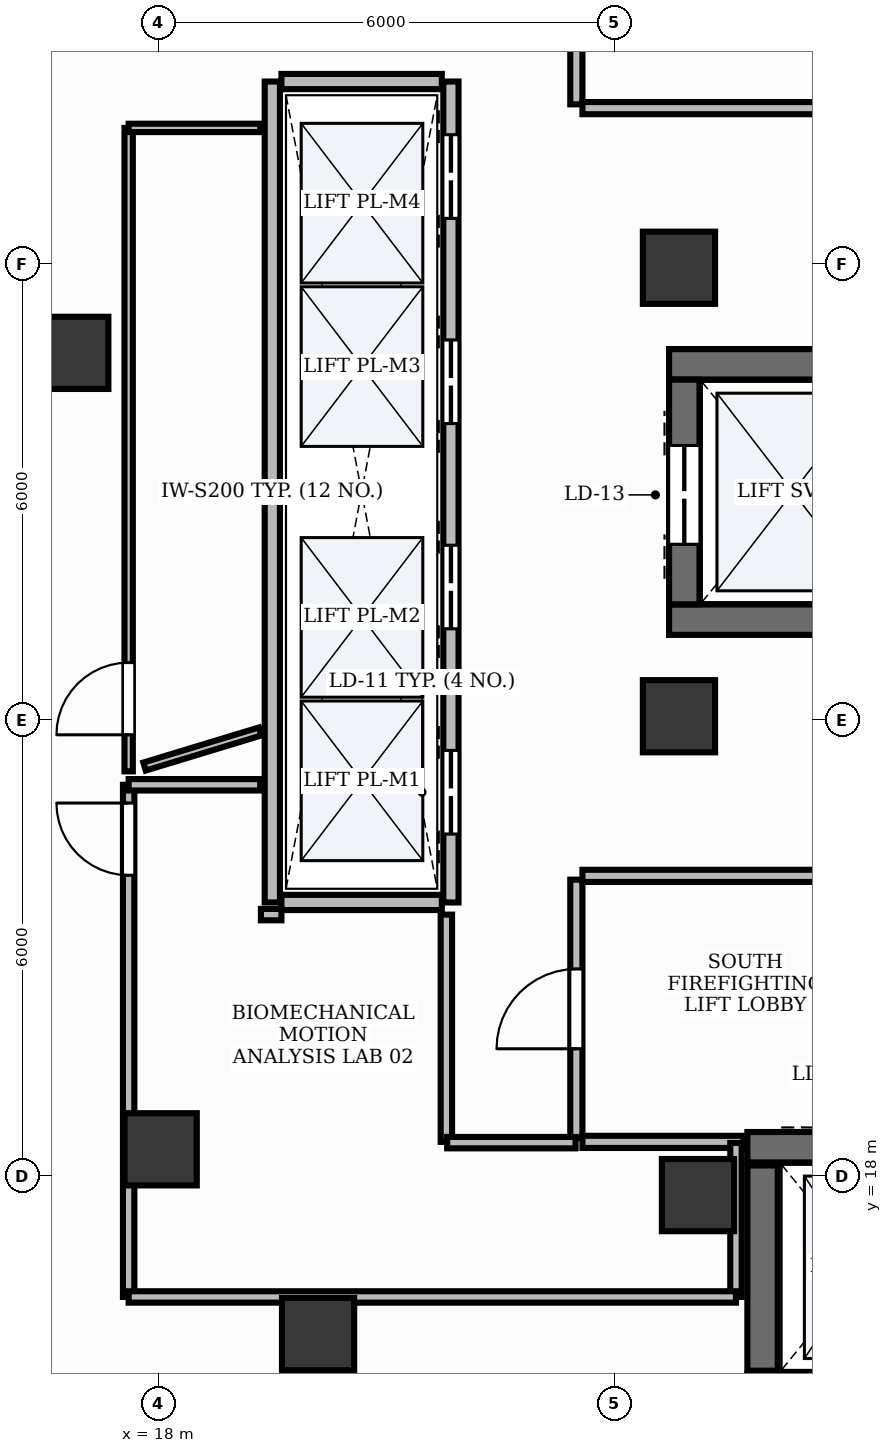
"""IFC4 building model, lengths in metres.
Left out: names, types, materials, properties, quantities, classifications, styles, units other than length and angle.
Written with IfcOpenShell. Run it as: python <this file> out.ifc"""

import sys

from ifc_helpers import new_model, si_unit, direction, frame, frame_2d, origin, origin_2d, place, context, subcontext, project, spatial, rectangle, extrude, element, fill, save


model = new_model("IFC4")
c1 = context("Model", 3, precision=1e-05, world=origin(), true_north=direction((0.0, 1.0)))
c2 = subcontext(c1, "Body", "Model", "MODEL_VIEW")
j1 = project(units=[si_unit("LENGTHUNIT", "METRE"), si_unit("PLANEANGLEUNIT", "RADIAN")], contexts=[c1])
p1 = place(None, origin())
s1 = spatial("IfcSite", under=j1, at=p1, CompositionType="ELEMENT")
p2 = place(p1, origin())
s2 = spatial("IfcBuilding", under=s1, at=p2, CompositionType="ELEMENT")
p3 = place(p2, frame((0.0, 0.0, 243.6)))
s3 = spatial("IfcBuildingStorey", under=s2, at=p3, CompositionType="ELEMENT", Elevation=243.6)
p4 = place(p3, frame((25.75, 18.38, 0.0), z_axis=(0.0, 0.0, 1.0), x_axis=(1.0, 0.0, 0.0)))
e1 = element("IfcWall", 1, at=p4, inside=s3, PredefinedType="SHEAR", context=c2, shape_type="SweptSolid", body=[
    extrude(rectangle(XDim=3.1, YDim=0.4, at=frame_2d((1.55, 0.0))), origin(), (0.0, 0.0, 1.0), 3.9),
])
p5 = place(p4, frame((0.9, 0.0, 0.0)))
e2 = element("IfcOpeningElement", 2, at=p5, cuts=e1, PredefinedType="OPENING", context=c2, shape_type="SweptSolid", body=[
    extrude(rectangle(XDim=1.3, YDim=2.2, at=frame_2d((0.65, 1.1))), frame((0.0, 0.215, 0.0), z_axis=(0.0, -1.0, 0.0), x_axis=(1.0, 0.0, 0.0)), (0.0, 0.0, 1.0), 0.43),
])
p6 = place(p3, frame((25.95, 15.44, 0.0), z_axis=(0.0, 0.0, 1.0), x_axis=(0.0, 1.0, 0.0)))
e3 = element("IfcWall", 3, at=p6, inside=s3, PredefinedType="SHEAR", context=c2, shape_type="SweptSolid", body=[
    extrude(rectangle(XDim=2.7, YDim=0.4, at=frame_2d((1.35, 0.0))), origin(), (0.0, 0.0, 1.0), 3.9),
])
for number, where, z_axis, x_axis in (
    (4, (24.72, 28.68, 0.0), (0.0, 0.0, 1.0), (1.0, 0.0, 0.0)),
    (5, (24.72, 25.32, 0.0), (0.0, 0.0, 1.0), (1.0, 0.0, 0.0)),
):
    element("IfcWall", number, at=place(p3, frame(where, z_axis=z_axis, x_axis=x_axis)), inside=s3, PredefinedType="SHEAR", context=c2, shape_type="SweptSolid", body=[
        extrude(rectangle(XDim=3.21, YDim=0.4, at=frame_2d((1.605, 0.0))), origin(), (0.0, 0.0, 1.0), 3.9),
    ])
p7 = place(p3, frame((24.92, 25.522, 0.0), z_axis=(0.0, 0.0, 1.0), x_axis=(0.0, 1.0, 0.0)))
e6 = element("IfcWall", 6, at=p7, inside=s3, PredefinedType="SHEAR", context=c2, shape_type="SweptSolid", body=[
    extrude(rectangle(XDim=2.956, YDim=0.4, at=frame_2d((1.478, 0.0))), origin(), (0.0, 0.0, 1.0), 3.9),
])
p8 = place(p7, frame((0.79, 0.0, 0.0)))
e7 = element("IfcOpeningElement", 7, at=p8, cuts=e6, PredefinedType="OPENING", context=c2, shape_type="SweptSolid", body=[
    extrude(rectangle(XDim=1.3, YDim=2.2, at=frame_2d((0.65, 1.1))), frame((0.0, 0.215, 0.0), z_axis=(0.0, -1.0, 0.0), x_axis=(1.0, 0.0, 0.0)), (0.0, 0.0, 1.0), 0.43),
])
for number, where, z_axis, x_axis in (
    (8, (24.85, 29.95, -0.0), (0.0, 0.0, 1.0), (1.0, 0.0, 0.0)),
    (9, (24.85, 24.05, -0.0), (0.0, 0.0, 1.0), (1.0, 0.0, 0.0)),
    (10, (25.1, 17.75, -0.0), (0.0, 0.0, 1.0), (1.0, 0.0, 0.0)),
):
    element("IfcColumn", number, at=place(p3, frame(where, z_axis=z_axis, x_axis=x_axis)), inside=s3, PredefinedType="PILASTER", context=c2, shape_type="SweptSolid", body=[
        extrude(rectangle(XDim=0.95, YDim=0.95, at=origin_2d()), origin(), (0.0, 0.0, 1.0), 3.901),
    ])
for number, where, z_axis, x_axis in (
    (11, (16.868, 28.83, -0.0), (0.0, 0.0, 1.0), (1.0, 0.0, 0.0)),
    (12, (18.031, 18.353, -0.0), (0.0, 0.0, 1.0), (1.0, 0.0, 0.0)),
    (13, (20.102, 15.921, -0.0), (0.0, 0.0, 1.0), (1.0, 0.0, 0.0)),
):
    element("IfcColumn", number, at=place(p3, frame(where, z_axis=z_axis, x_axis=x_axis)), inside=s3, PredefinedType="COLUMN", context=c2, shape_type="SweptSolid", body=[
        extrude(rectangle(XDim=0.95, YDim=0.95, at=origin_2d()), origin(), (0.0, 0.0, 1.0), 3.901),
    ])
p9 = place(p3, frame((19.5, 21.6, 0.0), z_axis=(0.0, 0.0, 1.0), x_axis=(0.0, 1.0, 0.0)))
e14 = element("IfcWall", 14, at=p9, inside=s3, PredefinedType="PARTITIONING", context=c2, shape_type="SweptSolid", body=[
    extrude(rectangle(XDim=10.8, YDim=0.2, at=frame_2d((5.4, 0.0))), origin(), (0.0, 0.0, 1.0), 2.91),
])
p10 = place(p3, frame((21.85, 21.6, 0.0), z_axis=(0.0, 0.0, 1.0), x_axis=(0.0, 1.0, 0.0)))
e15 = element("IfcWall", 15, at=p10, inside=s3, PredefinedType="PARTITIONING", context=c2, shape_type="SweptSolid", body=[
    extrude(rectangle(XDim=10.8, YDim=0.2, at=frame_2d((5.4, 0.0))), origin(), (0.0, 0.0, 1.0), 2.91),
])
p11 = place(p10, frame((0.9, 0.0, 0.0)))
e16 = element("IfcOpeningElement", 16, at=p11, cuts=e15, PredefinedType="OPENING", context=c2, shape_type="SweptSolid", body=[
    extrude(rectangle(XDim=1.1, YDim=2.2, at=frame_2d((0.55, 1.1))), frame((0.0, 0.115, 0.0), z_axis=(0.0, -1.0, 0.0), x_axis=(1.0, 0.0, 0.0)), (0.0, 0.0, 1.0), 0.23),
])
p12 = place(p10, frame((3.6, 0.0, 0.0)))
e17 = element("IfcOpeningElement", 17, at=p12, cuts=e15, PredefinedType="OPENING", context=c2, shape_type="SweptSolid", body=[
    extrude(rectangle(XDim=1.1, YDim=2.2, at=frame_2d((0.55, 1.1))), frame((0.0, 0.115, 0.0), z_axis=(0.0, -1.0, 0.0), x_axis=(1.0, 0.0, 0.0)), (0.0, 0.0, 1.0), 0.23),
])
p13 = place(p10, frame((6.3, 0.0, 0.0)))
e18 = element("IfcOpeningElement", 18, at=p13, cuts=e15, PredefinedType="OPENING", context=c2, shape_type="SweptSolid", body=[
    extrude(rectangle(XDim=1.1, YDim=2.2, at=frame_2d((0.55, 1.1))), frame((0.0, 0.115, 0.0), z_axis=(0.0, -1.0, 0.0), x_axis=(1.0, 0.0, 0.0)), (0.0, 0.0, 1.0), 0.23),
])
p14 = place(p10, frame((9.0, 0.0, 0.0)))
e19 = element("IfcOpeningElement", 19, at=p14, cuts=e15, PredefinedType="OPENING", context=c2, shape_type="SweptSolid", body=[
    extrude(rectangle(XDim=1.1, YDim=2.2, at=frame_2d((0.55, 1.1))), frame((0.0, 0.115, 0.0), z_axis=(0.0, -1.0, 0.0), x_axis=(1.0, 0.0, 0.0)), (0.0, 0.0, 1.0), 0.23),
])
for number, where, z_axis, x_axis in (
    (20, (19.62, 21.6, 0.0), (0.0, 0.0, 1.0), (1.0, 0.0, 0.0)),
    (21, (19.62, 32.4, 0.0), (0.0, 0.0, 1.0), (1.0, 0.0, 0.0)),
):
    element("IfcWall", number, at=place(p3, frame(where, z_axis=z_axis, x_axis=x_axis)), inside=s3, PredefinedType="PARTITIONING", context=c2, shape_type="SweptSolid", body=[
        extrude(rectangle(XDim=2.11, YDim=0.2, at=frame_2d((1.055, 0.0))), origin(), (0.0, 0.0, 1.0), 2.91),
    ])
p15 = place(p3, frame((23.5, 32.1, 0.0), z_axis=(0.0, 0.0, 1.0), x_axis=(0.0, 1.0, 0.0)))
e22 = element("IfcWall", 22, at=p15, inside=s3, PredefinedType="PARTITIONING", context=c2, shape_type="SweptSolid", body=[
    extrude(rectangle(XDim=3.4, YDim=0.16, at=frame_2d((1.7, 0.0))), origin(), (0.0, 0.0, 1.0), 2.91),
])
p16 = place(p15, frame((1.175, 0.0, 0.0)))
e23 = element("IfcOpeningElement", 23, at=p16, cuts=e22, PredefinedType="OPENING", context=c2, shape_type="SweptSolid", body=[
    extrude(rectangle(XDim=1.05, YDim=2.15, at=frame_2d((0.525, 1.075))), frame((0.0, 0.095, 0.0), z_axis=(0.0, -1.0, 0.0), x_axis=(1.0, 0.0, 0.0)), (0.0, 0.0, 1.0), 0.19),
])
p17 = place(p3, frame((23.5, 18.5, 0.0), z_axis=(0.0, 0.0, 1.0), x_axis=(0.0, 1.0, 0.0)))
e24 = element("IfcWall", 24, at=p17, inside=s3, PredefinedType="PARTITIONING", context=c2, shape_type="SweptSolid", body=[
    extrude(rectangle(XDim=3.4, YDim=0.16, at=frame_2d((1.7, 0.0))), origin(), (0.0, 0.0, 1.0), 2.91),
])
p18 = place(p17, frame((1.175, 0.0, 0.0)))
e25 = element("IfcOpeningElement", 25, at=p18, cuts=e24, PredefinedType="OPENING", context=c2, shape_type="SweptSolid", body=[
    extrude(rectangle(XDim=1.05, YDim=2.15, at=frame_2d((0.525, 1.075))), frame((0.0, 0.095, 0.0), z_axis=(0.0, -1.0, 0.0), x_axis=(1.0, 0.0, 0.0)), (0.0, 0.0, 1.0), 0.19),
])
for number, where, z_axis, x_axis in (
    (26, (23.58, 32.05, 0.0), (0.0, 0.0, 1.0), (1.0, 0.0, 0.0)),
    (27, (23.58, 21.95, 0.0), (0.0, 0.0, 1.0), (1.0, 0.0, 0.0)),
):
    element("IfcWall", number, at=place(p3, frame(where, z_axis=z_axis, x_axis=x_axis)), inside=s3, PredefinedType="PARTITIONING", context=c2, shape_type="SweptSolid", body=[
        extrude(rectangle(XDim=4.97, YDim=0.16, at=frame_2d((2.485, 0.0))), origin(), (0.0, 0.0, 1.0), 2.91),
    ])
p19 = place(p3, frame((23.58, 18.45, 0.0), z_axis=(0.0, 0.0, 1.0), x_axis=(1.0, 0.0, 0.0)))
e28 = element("IfcWall", 28, at=p19, inside=s3, PredefinedType="PARTITIONING", context=c2, shape_type="SweptSolid", body=[
    extrude(rectangle(XDim=2.12, YDim=0.16, at=frame_2d((1.06, 0.0))), origin(), (0.0, 0.0, 1.0), 2.91),
])
p20 = place(p3, frame((17.61, 16.41, 0.0), z_axis=(0.0, 0.0, 1.0), x_axis=(0.0, 1.0, 0.0)))
e29 = element("IfcWall", 29, at=p20, inside=s3, PredefinedType="PARTITIONING", context=c2, shape_type="SweptSolid", body=[
    extrude(rectangle(XDim=6.738, YDim=0.15, at=frame_2d((3.369, 0.0))), origin(), (0.0, 0.0, 1.0), 2.91),
])
p21 = place(p20, frame((5.548, 0.0, 0.0)))
e30 = element("IfcOpeningElement", 30, at=p21, cuts=e29, PredefinedType="OPENING", context=c2, shape_type="SweptSolid", body=[
    extrude(rectangle(XDim=0.95, YDim=2.15, at=frame_2d((0.475, 1.075))), frame((0.0, 0.09, 0.0), z_axis=(0.0, -1.0, 0.0), x_axis=(1.0, 0.0, 0.0)), (0.0, 0.0, 1.0), 0.18),
])
p22 = place(p3, frame((17.61, 23.324, 0.0), z_axis=(0.0, 0.0, 1.0), x_axis=(0.0, 1.0, 0.0)))
e31 = element("IfcWall", 31, at=p22, inside=s3, PredefinedType="MOVABLE", context=c2, shape_type="SweptSolid", body=[
    extrude(rectangle(XDim=8.466, YDim=0.11, at=frame_2d((4.233, 0.0))), origin(), (0.0, 0.0, 1.0), 2.91),
])
p23 = place(p22, frame((0.481, 0.0, 0.0)))
e32 = element("IfcOpeningElement", 32, at=p23, cuts=e31, PredefinedType="OPENING", context=c2, shape_type="SweptSolid", body=[
    extrude(rectangle(XDim=0.95, YDim=2.15, at=frame_2d((0.475, 1.075))), frame((0.0, 0.07, 0.0), z_axis=(0.0, -1.0, 0.0), x_axis=(1.0, 0.0, 0.0)), (0.0, 0.0, 1.0), 0.14),
])
p24 = place(p3, frame((19.35, 21.44, 0.0), z_axis=(0.0, 0.0, 1.0), x_axis=(1.0, 0.0, 0.0)))
e33 = element("IfcWall", 33, at=p24, inside=s3, PredefinedType="PARTITIONING", context=c2, shape_type="SweptSolid", body=[
    extrude(rectangle(XDim=0.27, YDim=0.15, at=frame_2d((0.135, 0.0))), origin(), (0.0, 0.0, 1.0), 2.91),
])
p25 = place(p3, frame((21.79, 21.44, 0.0), z_axis=(0.0, 0.0, 1.0), x_axis=(0.0, -1.0, 0.0)))
e34 = element("IfcWall", 34, at=p25, inside=s3, PredefinedType="PARTITIONING", context=c2, shape_type="SweptSolid", body=[
    extrude(rectangle(XDim=2.99, YDim=0.15, at=frame_2d((1.495, 0.0))), origin(), (0.0, 0.0, 1.0), 2.91),
])
p26 = place(p3, frame((21.8, 18.44, 0.0), z_axis=(0.0, 0.0, 1.0), x_axis=(1.0, 0.0, 0.0)))
e35 = element("IfcWall", 35, at=p26, inside=s3, PredefinedType="PARTITIONING", context=c2, shape_type="SweptSolid", body=[
    extrude(rectangle(XDim=1.69, YDim=0.15, at=frame_2d((0.845, 0.0))), origin(), (0.0, 0.0, 1.0), 2.91),
])
p27 = place(p3, frame((25.6, 18.436, 0.0), z_axis=(0.0, 0.0, 1.0), x_axis=(0.0, -1.0, 0.0)))
e36 = element("IfcWall", 36, at=p27, inside=s3, PredefinedType="PARTITIONING", context=c2, shape_type="SweptSolid", body=[
    extrude(rectangle(XDim=2.026, YDim=0.15, at=frame_2d((1.013, 0.0))), origin(), (0.0, 0.0, 1.0), 2.91),
])
p28 = place(p3, frame((25.6, 16.41, 0.0), z_axis=(0.0, 0.0, 1.0), x_axis=(-1.0, 0.0, 0.0)))
e37 = element("IfcWall", 37, at=p28, inside=s3, PredefinedType="PARTITIONING", context=c2, shape_type="SweptSolid", body=[
    extrude(rectangle(XDim=7.99, YDim=0.15, at=frame_2d((3.995, 0.0))), origin(), (0.0, 0.0, 1.0), 2.91),
])
p29 = place(p3, frame((17.61, 23.148, 0.0), z_axis=(0.0, 0.0, 1.0), x_axis=(1.0, 0.0, 0.0)))
e38 = element("IfcWall", 38, at=p29, inside=s3, PredefinedType="PARTITIONING", context=c2, shape_type="SweptSolid", body=[
    extrude(rectangle(XDim=1.73, YDim=0.15, at=frame_2d((0.865, 0.0))), origin(), (0.0, 0.0, 1.0), 2.91),
])
p30 = place(p3, frame((19.34, 23.85, 0.0), z_axis=(0.0, 0.0, 1.0), x_axis=(-0.956878289182, -0.290489138681, 0.0)))
e39 = element("IfcWall", 39, at=p30, inside=s3, PredefinedType="MOVABLE", context=c2, shape_type="SweptSolid", body=[
    extrude(rectangle(XDim=1.589, YDim=0.11, at=frame_2d((0.795, 0.0))), origin(), (0.0, 0.0, 1.0), 2.91),
])
p31 = place(p3, frame((17.61, 31.79, 0.0), z_axis=(0.0, 0.0, 1.0), x_axis=(1.0, 0.0, 0.0)))
e40 = element("IfcWall", 40, at=p31, inside=s3, PredefinedType="MOVABLE", context=c2, shape_type="SweptSolid", body=[
    extrude(rectangle(XDim=1.73, YDim=0.11, at=frame_2d((0.865, 0.0))), origin(), (0.0, 0.0, 1.0), 2.91),
])
p32 = place(p11, origin())
e41 = element("IfcDoor", 41, at=p32, inside=s3, OperationType="DOUBLE_DOOR_SLIDING", PredefinedType="DOOR", context=c2, shape_type="SweptSolid", body=[
    extrude(rectangle(XDim=1.1, YDim=2.2, at=frame_2d((0.55, 1.1))), frame((0.0, 0.025, 0.0), z_axis=(0.0, -1.0, 0.0), x_axis=(1.0, 0.0, 0.0)), (0.0, 0.0, 1.0), 0.05),
])
fill(e16, e41)
p33 = place(p12, origin())
e42 = element("IfcDoor", 42, at=p33, inside=s3, OperationType="DOUBLE_DOOR_SLIDING", PredefinedType="DOOR", context=c2, shape_type="SweptSolid", body=[
    extrude(rectangle(XDim=1.1, YDim=2.2, at=frame_2d((0.55, 1.1))), frame((0.0, 0.025, 0.0), z_axis=(0.0, -1.0, 0.0), x_axis=(1.0, 0.0, 0.0)), (0.0, 0.0, 1.0), 0.05),
])
fill(e17, e42)
p34 = place(p13, origin())
e43 = element("IfcDoor", 43, at=p34, inside=s3, OperationType="DOUBLE_DOOR_SLIDING", PredefinedType="DOOR", context=c2, shape_type="SweptSolid", body=[
    extrude(rectangle(XDim=1.1, YDim=2.2, at=frame_2d((0.55, 1.1))), frame((0.0, 0.025, 0.0), z_axis=(0.0, -1.0, 0.0), x_axis=(1.0, 0.0, 0.0)), (0.0, 0.0, 1.0), 0.05),
])
fill(e18, e43)
p35 = place(p14, origin())
e44 = element("IfcDoor", 44, at=p35, inside=s3, OperationType="DOUBLE_DOOR_SLIDING", PredefinedType="DOOR", context=c2, shape_type="SweptSolid", body=[
    extrude(rectangle(XDim=1.1, YDim=2.2, at=frame_2d((0.55, 1.1))), frame((0.0, 0.025, 0.0), z_axis=(0.0, -1.0, 0.0), x_axis=(1.0, 0.0, 0.0)), (0.0, 0.0, 1.0), 0.05),
])
fill(e19, e44)
p36 = place(p8, origin())
e45 = element("IfcDoor", 45, at=p36, inside=s3, OperationType="DOUBLE_DOOR_SLIDING", PredefinedType="DOOR", context=c2, shape_type="SweptSolid", body=[
    extrude(rectangle(XDim=1.3, YDim=2.2, at=frame_2d((0.65, 1.1))), frame((0.0, 0.025, 0.0), z_axis=(0.0, -1.0, 0.0), x_axis=(1.0, 0.0, 0.0)), (0.0, 0.0, 1.0), 0.05),
])
fill(e7, e45)
p37 = place(p18, origin())
e46 = element("IfcDoor", 46, at=p37, inside=s3, OperationType="SINGLE_SWING_LEFT", PredefinedType="DOOR", context=c2, shape_type="SweptSolid", body=[
    extrude(rectangle(XDim=1.05, YDim=2.15, at=frame_2d((0.525, 1.075))), frame((0.0, 0.025, 0.0), z_axis=(0.0, -1.0, 0.0), x_axis=(1.0, 0.0, 0.0)), (0.0, 0.0, 1.0), 0.05),
])
fill(e25, e46)
p38 = place(p21, origin())
e47 = element("IfcDoor", 47, at=p38, inside=s3, OperationType="SINGLE_SWING_RIGHT", PredefinedType="DOOR", context=c2, shape_type="SweptSolid", body=[
    extrude(rectangle(XDim=0.95, YDim=2.15, at=frame_2d((0.475, 1.075))), frame((0.0, 0.025, 0.0), z_axis=(0.0, -1.0, 0.0), x_axis=(1.0, 0.0, 0.0)), (0.0, 0.0, 1.0), 0.05),
])
fill(e30, e47)
p39 = place(p23, origin())
e48 = element("IfcDoor", 48, at=p39, inside=s3, OperationType="SINGLE_SWING_LEFT", PredefinedType="DOOR", context=c2, shape_type="SweptSolid", body=[
    extrude(rectangle(XDim=0.95, YDim=2.15, at=frame_2d((0.475, 1.075))), frame((0.0, 0.025, 0.0), z_axis=(0.0, -1.0, 0.0), x_axis=(1.0, 0.0, 0.0)), (0.0, 0.0, 1.0), 0.05),
])
fill(e32, e48)
save(model, sys.argv[1])
